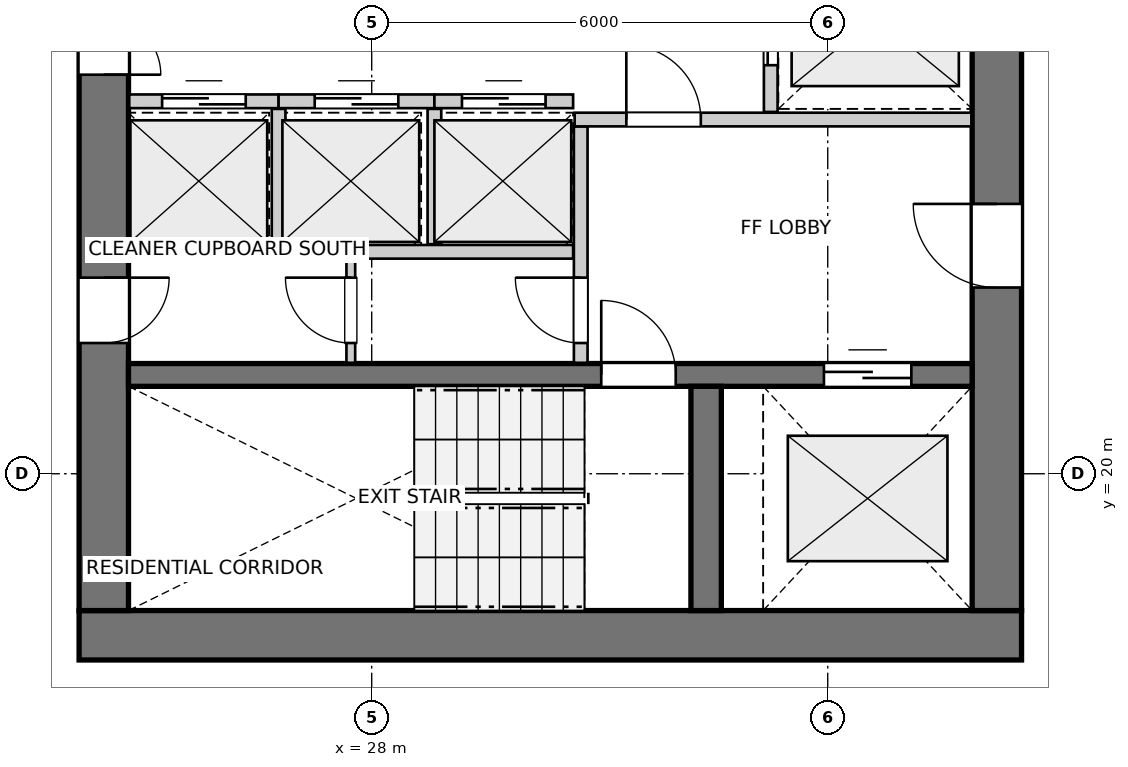
"""IFC4 building model, lengths in metres.
Left out: names, types, materials, properties, quantities, classifications, styles, units other than length and angle.
Written with IfcOpenShell. Run it as: python <this file> out.ifc"""

import sys

from ifc_helpers import new_model, si_unit, direction, frame, frame_2d, origin, place, context, subcontext, project, spatial, rectangle, extrude, source, transform, mapped, element, fill, save


model = new_model("IFC4")
c1 = context("Model", 3, precision=1e-05, world=origin(), true_north=direction((0.0, 1.0)))
c2 = subcontext(c1, "Body", "Model", "MODEL_VIEW")
j1 = project(units=[si_unit("LENGTHUNIT", "METRE"), si_unit("PLANEANGLEUNIT", "RADIAN")], contexts=[c1])
p1 = place(None, origin())
s1 = spatial("IfcSite", under=j1, at=p1, CompositionType="ELEMENT")
p2 = place(p1, origin())
s2 = spatial("IfcBuilding", under=s1, at=p2, CompositionType="ELEMENT")
p3 = place(p2, frame((0.0, 0.0, 80.0)))
s3 = spatial("IfcBuildingStorey", under=s2, at=p3, CompositionType="ELEMENT", Elevation=80.0)
p4 = place(p3, frame((24.15, 17.875, 0.0), z_axis=(0.0, 0.0, 1.0), x_axis=(1.0, 0.0, 0.0)))
e1 = element("IfcWall", 1, at=p4, inside=s3, PredefinedType="SHEAR", context=c2, shape_type="SweptSolid", body=[
    extrude(rectangle(XDim=12.4, YDim=0.65, at=frame_2d((6.2, 0.0))), origin(), (0.0, 0.0, 1.0), 2.935),
])
p5 = place(p3, frame((24.475, 33.8, 0.0), z_axis=(0.0, 0.0, 1.0), x_axis=(0.0, -1.0, 0.0)))
e2 = element("IfcWall", 2, at=p5, inside=s3, PredefinedType="SHEAR", context=c2, shape_type="SweptSolid", body=[
    extrude(rectangle(XDim=15.6, YDim=0.65, at=frame_2d((7.8, 0.0))), origin(), (0.0, 0.0, 1.0), 2.935),
])
p6 = place(p5, frame((7.05, 0.0, 0.0)))
e3 = element("IfcOpeningElement", 3, at=p6, cuts=e2, PredefinedType="OPENING", context=c2, shape_type="SweptSolid", body=[
    extrude(rectangle(XDim=1.5, YDim=2.15, at=frame_2d((0.75, 1.075))), frame((0.0, 0.335, 0.0), z_axis=(0.0, -1.0, 0.0), x_axis=(1.0, 0.0, 0.0)), (0.0, 0.0, 1.0), 0.67),
])
p7 = place(p5, frame((3.52, 0.0, 0.0)))
e4 = element("IfcOpeningElement", 4, at=p7, cuts=e2, PredefinedType="OPENING", context=c2, shape_type="SweptSolid", body=[
    extrude(rectangle(XDim=0.86, YDim=2.05, at=frame_2d((0.43, 1.025))), frame((0.0, 0.335, 0.0), z_axis=(0.0, -1.0, 0.0), x_axis=(1.0, 0.0, 0.0)), (0.0, 0.0, 1.0), 0.67),
])
p8 = place(p5, frame((11.22, 0.0, 0.0)))
e5 = element("IfcOpeningElement", 5, at=p8, cuts=e2, PredefinedType="OPENING", context=c2, shape_type="SweptSolid", body=[
    extrude(rectangle(XDim=0.86, YDim=2.05, at=frame_2d((0.43, 1.025))), frame((0.0, 0.335, 0.0), z_axis=(0.0, -1.0, 0.0), x_axis=(1.0, 0.0, 0.0)), (0.0, 0.0, 1.0), 0.67),
])
p9 = place(p3, frame((36.225, 18.2, 0.0), z_axis=(0.0, 0.0, 1.0), x_axis=(0.0, 1.0, 0.0)))
e6 = element("IfcWall", 6, at=p9, inside=s3, PredefinedType="SHEAR", context=c2, shape_type="SweptSolid", body=[
    extrude(rectangle(XDim=15.6, YDim=0.65, at=frame_2d((7.8, 0.0))), origin(), (0.0, 0.0, 1.0), 2.935),
])
p10 = place(p9, frame((4.25, 0.0, 0.0)))
e7 = element("IfcOpeningElement", 7, at=p10, cuts=e6, PredefinedType="OPENING", context=c2, shape_type="SweptSolid", body=[
    extrude(rectangle(XDim=1.1, YDim=2.15, at=frame_2d((0.55, 1.075))), frame((0.0, 0.335, 0.0), z_axis=(0.0, -1.0, 0.0), x_axis=(1.0, 0.0, 0.0)), (0.0, 0.0, 1.0), 0.67),
])
p11 = place(p9, frame((10.25, 0.0, 0.0)))
e8 = element("IfcOpeningElement", 8, at=p11, cuts=e6, PredefinedType="OPENING", context=c2, shape_type="SweptSolid", body=[
    extrude(rectangle(XDim=1.1, YDim=2.15, at=frame_2d((0.55, 1.075))), frame((0.0, 0.335, 0.0), z_axis=(0.0, -1.0, 0.0), x_axis=(1.0, 0.0, 0.0)), (0.0, 0.0, 1.0), 0.67),
])
p12 = place(p3, frame((24.8, 21.3, 0.0), z_axis=(0.0, 0.0, 1.0), x_axis=(1.0, 0.0, 0.0)))
e9 = element("IfcWall", 9, at=p12, inside=s3, PredefinedType="SHEAR", context=c2, shape_type="SweptSolid", body=[
    extrude(rectangle(XDim=11.1, YDim=0.3, at=frame_2d((5.55, 0.0))), origin(), (0.0, 0.0, 1.0), 2.935),
])
p13 = place(p12, frame((6.22, 0.0, 0.0)))
e10 = element("IfcOpeningElement", 10, at=p13, cuts=e9, PredefinedType="OPENING", context=c2, shape_type="SweptSolid", body=[
    extrude(rectangle(XDim=0.98, YDim=2.15, at=frame_2d((0.49, 1.075))), frame((0.0, 0.16, 0.0), z_axis=(0.0, -1.0, 0.0), x_axis=(1.0, 0.0, 0.0)), (0.0, 0.0, 1.0), 0.32),
])
p14 = place(p12, frame((9.15, 0.0, 0.0)))
e11 = element("IfcOpeningElement", 11, at=p14, cuts=e9, PredefinedType="OPENING", context=c2, shape_type="SweptSolid", body=[
    extrude(rectangle(XDim=1.15, YDim=2.15, at=frame_2d((0.575, 1.075))), frame((0.0, 0.16, 0.0), z_axis=(0.0, -1.0, 0.0), x_axis=(1.0, 0.0, 0.0)), (0.0, 0.0, 1.0), 0.32),
])
p15 = place(p3, frame((32.4, 18.2, 0.0), z_axis=(0.0, 0.0, 1.0), x_axis=(0.0, 1.0, 0.0)))
e12 = element("IfcWall", 12, at=p15, inside=s3, PredefinedType="SHEAR", context=c2, shape_type="SweptSolid", body=[
    extrude(rectangle(XDim=2.95, YDim=0.4, at=frame_2d((1.475, 0.0))), origin(), (0.0, 0.0, 1.0), 2.935),
])
p16 = place(p3, frame((30.75, 21.46, 0.0), z_axis=(0.0, 0.0, 1.0), x_axis=(0.0, 1.0, 0.0)))
e13 = element("IfcWall", 13, at=p16, inside=s3, PredefinedType="PARTITIONING", context=c2, shape_type="SweptSolid", body=[
    extrude(rectangle(XDim=3.11, YDim=0.18, at=frame_2d((1.555, 0.0))), origin(), (0.0, 0.0, 1.0), 2.935),
])
p17 = place(p16, frame((0.26, 0.0, 0.0)))
e14 = element("IfcOpeningElement", 14, at=p17, cuts=e13, PredefinedType="OPENING", context=c2, shape_type="SweptSolid", body=[
    extrude(rectangle(XDim=0.86, YDim=2.05, at=frame_2d((0.43, 1.025))), frame((0.0, 0.1, 0.0), z_axis=(0.0, -1.0, 0.0), x_axis=(1.0, 0.0, 0.0)), (0.0, 0.0, 1.0), 0.2),
])
p18 = place(p3, frame((30.67, 24.66, 0.0), z_axis=(0.0, 0.0, 1.0), x_axis=(1.0, 0.0, 0.0)))
e15 = element("IfcWall", 15, at=p18, inside=s3, PredefinedType="PARTITIONING", context=c2, shape_type="SweptSolid", body=[
    extrude(rectangle(XDim=5.22, YDim=0.18, at=frame_2d((2.61, 0.0))), origin(), (0.0, 0.0, 1.0), 2.935),
])
p19 = place(p18, frame((0.68, 0.0, 0.0)))
e16 = element("IfcOpeningElement", 16, at=p19, cuts=e15, PredefinedType="OPENING", context=c2, shape_type="SweptSolid", body=[
    extrude(rectangle(XDim=0.98, YDim=2.15, at=frame_2d((0.49, 1.075))), frame((0.0, 0.1, 0.0), z_axis=(0.0, -1.0, 0.0), x_axis=(1.0, 0.0, 0.0)), (0.0, 0.0, 1.0), 0.2),
])
p20 = place(p3, frame((33.25, 24.76, 0.0), z_axis=(0.0, 0.0, 1.0), x_axis=(0.0, 1.0, 0.0)))
e17 = element("IfcWall", 17, at=p20, inside=s3, PredefinedType="PARTITIONING", context=c2, shape_type="SweptSolid", body=[
    extrude(rectangle(XDim=2.48, YDim=0.18, at=frame_2d((1.24, 0.0))), origin(), (0.0, 0.0, 1.0), 2.935),
])
p21 = place(p20, frame((0.615, 0.0, 0.0)))
e18 = element("IfcOpeningElement", 18, at=p21, cuts=e17, PredefinedType="OPENING", context=c2, shape_type="SweptSolid", body=[
    extrude(rectangle(XDim=1.25, YDim=2.15, at=frame_2d((0.625, 1.075))), frame((0.0, 0.1, 0.0), z_axis=(0.0, -1.0, 0.0), x_axis=(1.0, 0.0, 0.0)), (0.0, 0.0, 1.0), 0.2),
])
p22 = place(p3, frame((24.81, 22.92, 0.0), z_axis=(0.0, 0.0, 1.0), x_axis=(1.0, 0.0, 0.0)))
e19 = element("IfcWall", 19, at=p22, inside=s3, PredefinedType="PARTITIONING", context=c2, shape_type="SweptSolid", body=[
    extrude(rectangle(XDim=5.84, YDim=0.18, at=frame_2d((2.92, 0.0))), origin(), (0.0, 0.0, 1.0), 2.935),
])
p23 = place(p3, frame((24.81, 24.9, 0.0), z_axis=(0.0, 0.0, 1.0), x_axis=(1.0, 0.0, 0.0)))
e20 = element("IfcWall", 20, at=p23, inside=s3, PredefinedType="PARTITIONING", context=c2, shape_type="SweptSolid", body=[
    extrude(rectangle(XDim=1.965, YDim=0.18, at=frame_2d((0.982, 0.0))), origin(), (0.0, 0.0, 1.0), 2.935),
])
p24 = place(p23, frame((0.433, 0.0, 0.0)))
e21 = element("IfcOpeningElement", 21, at=p24, cuts=e20, PredefinedType="OPENING", context=c2, shape_type="SweptSolid", body=[
    extrude(rectangle(XDim=1.1, YDim=2.15, at=frame_2d((0.55, 1.075))), frame((0.0, 0.1, 0.0), z_axis=(0.0, -1.0, 0.0), x_axis=(1.0, 0.0, 0.0)), (0.0, 0.0, 1.0), 0.2),
])
p25 = place(p3, frame((26.775, 24.9, 0.0), z_axis=(0.0, 0.0, 1.0), x_axis=(1.0, 0.0, 0.0)))
e22 = element("IfcWall", 22, at=p25, inside=s3, PredefinedType="PARTITIONING", context=c2, shape_type="SweptSolid", body=[
    extrude(rectangle(XDim=2.05, YDim=0.18, at=frame_2d((1.025, 0.0))), origin(), (0.0, 0.0, 1.0), 2.935),
])
p26 = place(p25, frame((0.475, 0.0, 0.0)))
e23 = element("IfcOpeningElement", 23, at=p26, cuts=e22, PredefinedType="OPENING", context=c2, shape_type="SweptSolid", body=[
    extrude(rectangle(XDim=1.1, YDim=2.15, at=frame_2d((0.55, 1.075))), frame((0.0, 0.1, 0.0), z_axis=(0.0, -1.0, 0.0), x_axis=(1.0, 0.0, 0.0)), (0.0, 0.0, 1.0), 0.2),
])
p27 = place(p3, frame((26.775, 23.02, 0.0), z_axis=(0.0, 0.0, 1.0), x_axis=(0.0, 1.0, 0.0)))
e24 = element("IfcWall", 24, at=p27, inside=s3, PredefinedType="PARTITIONING", context=c2, shape_type="SweptSolid", body=[
    extrude(rectangle(XDim=1.78, YDim=0.18, at=frame_2d((0.89, 0.0))), origin(), (0.0, 0.0, 1.0), 2.935),
])
p28 = place(p3, frame((28.825, 24.9, 0.0), z_axis=(0.0, 0.0, 1.0), x_axis=(1.0, 0.0, 0.0)))
e25 = element("IfcWall", 25, at=p28, inside=s3, PredefinedType="PARTITIONING", context=c2, shape_type="SweptSolid", body=[
    extrude(rectangle(XDim=1.825, YDim=0.18, at=frame_2d((0.913, 0.0))), origin(), (0.0, 0.0, 1.0), 2.935),
])
p29 = place(p28, frame((0.363, 0.0, 0.0)))
e26 = element("IfcOpeningElement", 26, at=p29, cuts=e25, PredefinedType="OPENING", context=c2, shape_type="SweptSolid", body=[
    extrude(rectangle(XDim=1.1, YDim=2.15, at=frame_2d((0.55, 1.075))), frame((0.0, 0.1, 0.0), z_axis=(0.0, -1.0, 0.0), x_axis=(1.0, 0.0, 0.0)), (0.0, 0.0, 1.0), 0.2),
])
p30 = place(p3, frame((28.825, 23.02, 0.0), z_axis=(0.0, 0.0, 1.0), x_axis=(0.0, 1.0, 0.0)))
e27 = element("IfcWall", 27, at=p30, inside=s3, PredefinedType="PARTITIONING", context=c2, shape_type="SweptSolid", body=[
    extrude(rectangle(XDim=1.78, YDim=0.18, at=frame_2d((0.89, 0.0))), origin(), (0.0, 0.0, 1.0), 2.935),
])
p31 = place(p3, frame((27.725, 21.46, 0.0), z_axis=(0.0, 0.0, 1.0), x_axis=(0.0, 1.0, 0.0)))
e28 = element("IfcWall", 28, at=p31, inside=s3, PredefinedType="PARTITIONING", context=c2, shape_type="SweptSolid", body=[
    extrude(rectangle(XDim=1.38, YDim=0.115, at=frame_2d((0.69, 0.0))), origin(), (0.0, 0.0, 1.0), 2.935),
])
p32 = place(p31, frame((0.26, 0.0, 0.0)))
e29 = element("IfcOpeningElement", 29, at=p32, cuts=e28, PredefinedType="OPENING", context=c2, shape_type="SweptSolid", body=[
    extrude(rectangle(XDim=0.86, YDim=2.05, at=frame_2d((0.43, 1.025))), frame((0.0, 0.067, 0.0), z_axis=(0.0, -1.0, 0.0), x_axis=(1.0, 0.0, 0.0)), (0.0, 0.0, 1.0), 0.135),
])
m1 = source(origin(), c2, "Body", "SweptSolid", [
    extrude(rectangle(XDim=0.98, YDim=2.15, at=frame_2d((0.49, 1.075))), frame((0.0, 0.025, 0.0), z_axis=(0.0, -1.0, 0.0), x_axis=(1.0, 0.0, 0.0)), (0.0, 0.0, 1.0), 0.05),
])
p33 = place(p13, origin())
e30 = element("IfcDoor", 30, at=p33, inside=s3, OperationType="SINGLE_SWING_LEFT", PredefinedType="DOOR", context=c2, shape_type="MappedRepresentation", body=[
    mapped(m1, transform((0.0, 0.0, 0.0), x_axis=(1.0, 0.0, 0.0), y_axis=(0.0, 1.0, 0.0), z_axis=(0.0, 0.0, 1.0), scale=1.0)),
])
fill(e10, e30)
m2 = source(origin(), c2, "Body", "SweptSolid", [
    extrude(rectangle(XDim=1.15, YDim=2.15, at=frame_2d((0.575, 1.075))), frame((0.0, 0.025, 0.0), z_axis=(0.0, -1.0, 0.0), x_axis=(1.0, 0.0, 0.0)), (0.0, 0.0, 1.0), 0.05),
])
p34 = place(p14, origin())
e31 = element("IfcDoor", 31, at=p34, inside=s3, OperationType="DOUBLE_DOOR_SLIDING", PredefinedType="DOOR", context=c2, shape_type="MappedRepresentation", body=[
    mapped(m2, transform((0.0, 0.0, 0.0), x_axis=(1.0, 0.0, 0.0), y_axis=(0.0, 1.0, 0.0), z_axis=(0.0, 0.0, 1.0), scale=1.0)),
])
fill(e11, e31)
m3 = source(origin(), c2, "Body", "SweptSolid", [
    extrude(rectangle(XDim=1.1, YDim=2.15, at=frame_2d((0.55, 1.075))), frame((0.0, 0.025, 0.0), z_axis=(0.0, -1.0, 0.0), x_axis=(1.0, 0.0, 0.0)), (0.0, 0.0, 1.0), 0.05),
])
p35 = place(p10, origin())
e32 = element("IfcDoor", 32, at=p35, inside=s3, OperationType="SINGLE_SWING_RIGHT", PredefinedType="DOOR", context=c2, shape_type="MappedRepresentation", body=[
    mapped(m3, transform((0.0, 0.0, 0.0), x_axis=(1.0, 0.0, 0.0), y_axis=(0.0, 1.0, 0.0), z_axis=(0.0, 0.0, 1.0), scale=1.0)),
])
fill(e7, e32)
m4 = source(origin(), c2, "Body", "SweptSolid", [
    extrude(rectangle(XDim=1.5, YDim=2.15, at=frame_2d((0.75, 1.075))), frame((0.0, 0.025, 0.0), z_axis=(0.0, -1.0, 0.0), x_axis=(1.0, 0.0, 0.0)), (0.0, 0.0, 1.0), 0.05),
])
p36 = place(p6, origin())
e33 = element("IfcDoor", 33, at=p36, inside=s3, OperationType="DOUBLE_DOOR_SINGLE_SWING", PredefinedType="DOOR", context=c2, shape_type="MappedRepresentation", body=[
    mapped(m4, transform((0.0, 0.0, 0.0), x_axis=(1.0, 0.0, 0.0), y_axis=(0.0, 1.0, 0.0), z_axis=(0.0, 0.0, 1.0), scale=1.0)),
])
fill(e3, e33)
m5 = source(origin(), c2, "Body", "SweptSolid", [
    extrude(rectangle(XDim=0.86, YDim=2.05, at=frame_2d((0.43, 1.025))), frame((0.0, 0.025, 0.0), z_axis=(0.0, -1.0, 0.0), x_axis=(1.0, 0.0, 0.0)), (0.0, 0.0, 1.0), 0.05),
])
p37 = place(p8, origin())
e34 = element("IfcDoor", 34, at=p37, inside=s3, OperationType="SINGLE_SWING_LEFT", PredefinedType="DOOR", context=c2, shape_type="MappedRepresentation", body=[
    mapped(m5, transform((0.0, 0.0, 0.0), x_axis=(1.0, 0.0, 0.0), y_axis=(0.0, 1.0, 0.0), z_axis=(0.0, 0.0, 1.0), scale=1.0)),
])
fill(e5, e34)
p38 = place(p17, origin())
e35 = element("IfcDoor", 35, at=p38, inside=s3, OperationType="SINGLE_SWING_RIGHT", PredefinedType="DOOR", context=c2, shape_type="MappedRepresentation", body=[
    mapped(m5, transform((0.0, 0.0, 0.0), x_axis=(1.0, 0.0, 0.0), y_axis=(0.0, 1.0, 0.0), z_axis=(0.0, 0.0, 1.0), scale=1.0)),
])
fill(e14, e35)
p39 = place(p19, origin())
e36 = element("IfcDoor", 36, at=p39, inside=s3, OperationType="SINGLE_SWING_LEFT", PredefinedType="DOOR", context=c2, shape_type="MappedRepresentation", body=[
    mapped(m1, transform((0.0, 0.0, 0.0), x_axis=(1.0, 0.0, 0.0), y_axis=(0.0, 1.0, 0.0), z_axis=(0.0, 0.0, 1.0), scale=1.0)),
])
fill(e16, e36)
m6 = source(origin(), c2, "Body", "SweptSolid", [
    extrude(rectangle(XDim=1.25, YDim=2.15, at=frame_2d((0.625, 1.075))), frame((0.0, 0.025, 0.0), z_axis=(0.0, -1.0, 0.0), x_axis=(1.0, 0.0, 0.0)), (0.0, 0.0, 1.0), 0.05),
])
p40 = place(p21, origin())
e37 = element("IfcDoor", 37, at=p40, inside=s3, OperationType="DOUBLE_DOOR_SLIDING", PredefinedType="DOOR", context=c2, shape_type="MappedRepresentation", body=[
    mapped(m6, transform((0.0, 0.0, 0.0), x_axis=(1.0, 0.0, 0.0), y_axis=(0.0, 1.0, 0.0), z_axis=(0.0, 0.0, 1.0), scale=1.0)),
])
fill(e18, e37)
p41 = place(p24, origin())
e38 = element("IfcDoor", 38, at=p41, inside=s3, OperationType="DOUBLE_DOOR_SLIDING", PredefinedType="DOOR", context=c2, shape_type="MappedRepresentation", body=[
    mapped(m3, transform((0.0, 0.0, 0.0), x_axis=(1.0, 0.0, 0.0), y_axis=(0.0, 1.0, 0.0), z_axis=(0.0, 0.0, 1.0), scale=1.0)),
])
fill(e21, e38)
p42 = place(p26, origin())
e39 = element("IfcDoor", 39, at=p42, inside=s3, OperationType="DOUBLE_DOOR_SLIDING", PredefinedType="DOOR", context=c2, shape_type="MappedRepresentation", body=[
    mapped(m3, transform((0.0, 0.0, 0.0), x_axis=(1.0, 0.0, 0.0), y_axis=(0.0, 1.0, 0.0), z_axis=(0.0, 0.0, 1.0), scale=1.0)),
])
fill(e23, e39)
p43 = place(p29, origin())
e40 = element("IfcDoor", 40, at=p43, inside=s3, OperationType="DOUBLE_DOOR_SLIDING", PredefinedType="DOOR", context=c2, shape_type="MappedRepresentation", body=[
    mapped(m3, transform((0.0, 0.0, 0.0), x_axis=(1.0, 0.0, 0.0), y_axis=(0.0, 1.0, 0.0), z_axis=(0.0, 0.0, 1.0), scale=1.0)),
])
fill(e26, e40)
p44 = place(p32, origin())
e41 = element("IfcDoor", 41, at=p44, inside=s3, OperationType="SINGLE_SWING_RIGHT", PredefinedType="DOOR", context=c2, shape_type="MappedRepresentation", body=[
    mapped(m5, transform((0.0, 0.0, 0.0), x_axis=(1.0, 0.0, 0.0), y_axis=(0.0, 1.0, 0.0), z_axis=(0.0, 0.0, 1.0), scale=1.0)),
])
fill(e29, e41)
save(model, sys.argv[1])
